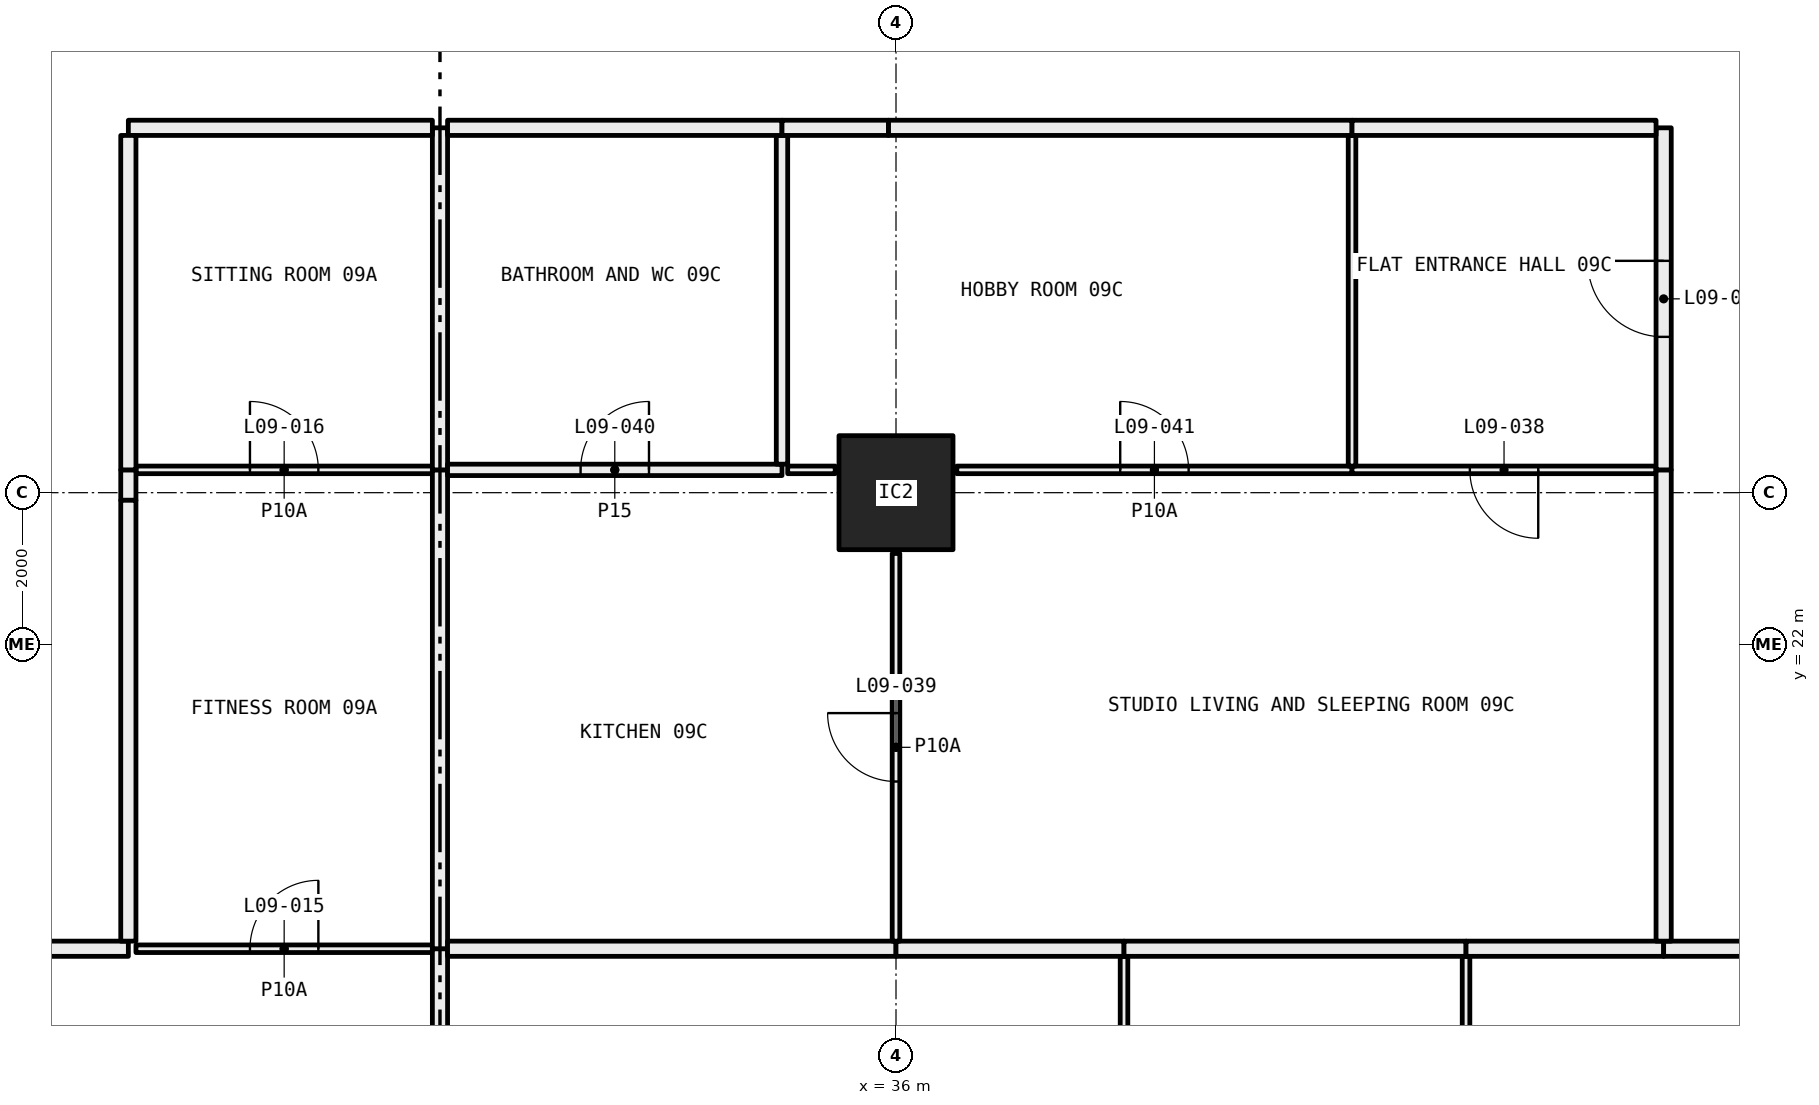
"""IFC4 building model, lengths in metres.
Left out: names, types, materials, properties, quantities, classifications, styles, units other than length and angle.
Written with IfcOpenShell. Run it as: python <this file> out.ifc"""

import sys

from ifc_helpers import new_model, si_unit, direction, frame, frame_2d, origin, origin_2d, place, context, subcontext, project, spatial, rectangle, hollow_rectangle, extrude, element, fill, save


model = new_model("IFC4")
c1 = context("Model", 3, precision=1e-05, world=origin(), true_north=direction((0.0, 1.0)))
c2 = subcontext(c1, "Body", "Model", "MODEL_VIEW")
j1 = project(units=[si_unit("LENGTHUNIT", "METRE"), si_unit("PLANEANGLEUNIT", "RADIAN")], contexts=[c1])
p1 = place(None, origin())
s1 = spatial("IfcSite", under=j1, at=p1, CompositionType="ELEMENT")
p2 = place(p1, origin())
s2 = spatial("IfcBuilding", under=s1, at=p2, CompositionType="ELEMENT")
p3 = place(p2, frame((0.0, 0.0, 43.8)))
s3 = spatial("IfcBuildingStorey", under=s2, at=p3, CompositionType="ELEMENT", Elevation=43.8)
p4 = place(p3, frame((36.0, 24.0, 0.0), z_axis=(0.0, 0.0, 1.0), x_axis=(1.0, 0.0, 0.0)))
e1 = element("IfcColumn", 1, at=p4, inside=s3, PredefinedType="COLUMN", context=c2, shape_type="SweptSolid", body=[
    extrude(hollow_rectangle(XDim=1.5, YDim=1.5, WallThickness=0.065, at=origin_2d()), origin(), (0.0, 0.0, 1.0), 3.05),
])
p5 = place(p3, frame((29.9, 18.0, 0.0), z_axis=(0.0, 0.0, 1.0), x_axis=(-1.0, 0.0, 0.0)))
e2 = element("IfcWall", 2, at=p5, inside=s3, PredefinedType="PARTITIONING", context=c2, shape_type="SweptSolid", body=[
    extrude(rectangle(XDim=3.9, YDim=0.1, at=frame_2d((1.95, 0.0))), origin(), (0.0, 0.0, 1.0), 3.05),
])
p6 = place(p5, frame((1.5, 0.0, 0.0)))
e3 = element("IfcOpeningElement", 3, at=p6, cuts=e2, PredefinedType="OPENING", context=c2, shape_type="SweptSolid", body=[
    extrude(rectangle(XDim=0.9, YDim=2.1, at=frame_2d((0.45, 1.05))), frame((0.0, 0.06, 0.0), z_axis=(0.0, -1.0, 0.0), x_axis=(1.0, 0.0, 0.0)), (0.0, 0.0, 1.0), 0.12),
])
p7 = place(p3, frame((30.0, 12.0, 0.0), z_axis=(0.0, 0.0, 1.0), x_axis=(0.0, 1.0, 0.0)))
e4 = element("IfcWall", 4, at=p7, inside=s3, PredefinedType="PARTITIONING", context=c2, shape_type="SweptSolid", body=[
    extrude(rectangle(XDim=6.0, YDim=0.2, at=frame_2d((3.0, 0.0))), origin(), (0.0, 0.0, 1.0), 2.45),
])
p8 = place(p3, frame((25.9, 18.0, 0.0), z_axis=(0.0, 0.0, 1.0), x_axis=(-1.0, 0.0, 0.0)))
e5 = element("IfcWall", 5, at=p8, inside=s3, PredefinedType="PARTITIONING", context=c2, shape_type="SweptSolid", body=[
    extrude(rectangle(XDim=1.9, YDim=0.2, at=frame_2d((0.95, 0.0))), origin(), (0.0, 0.0, 1.0), 3.05),
])
p9 = place(p3, frame((29.9, 24.3, 0.0), z_axis=(0.0, 0.0, 1.0), x_axis=(-1.0, 0.0, 0.0)))
e6 = element("IfcWall", 6, at=p9, inside=s3, PredefinedType="PARTITIONING", context=c2, shape_type="SweptSolid", body=[
    extrude(rectangle(XDim=3.9, YDim=0.1, at=frame_2d((1.95, 0.0))), origin(), (0.0, 0.0, 1.0), 3.05),
])
p10 = place(p9, frame((1.5, 0.0, 0.0)))
e7 = element("IfcOpeningElement", 7, at=p10, cuts=e6, PredefinedType="OPENING", context=c2, shape_type="SweptSolid", body=[
    extrude(rectangle(XDim=0.9, YDim=2.1, at=frame_2d((0.45, 1.05))), frame((0.0, 0.06, 0.0), z_axis=(0.0, -1.0, 0.0), x_axis=(1.0, 0.0, 0.0)), (0.0, 0.0, 1.0), 0.12),
])
p11 = place(p3, frame((30.0, 18.0, 0.0), z_axis=(0.0, 0.0, 1.0), x_axis=(0.0, 1.0, 0.0)))
e8 = element("IfcWall", 8, at=p11, inside=s3, PredefinedType="PARTITIONING", context=c2, shape_type="SweptSolid", body=[
    extrude(rectangle(XDim=6.3, YDim=0.2, at=frame_2d((3.15, 0.0))), origin(), (0.0, 0.0, 1.0), 2.45),
])
p12 = place(p3, frame((25.9, 24.3, 0.0), z_axis=(0.0, 0.0, 1.0), x_axis=(0.0, -1.0, 0.0)))
e9 = element("IfcWall", 9, at=p12, inside=s3, PredefinedType="PARTITIONING", context=c2, shape_type="SweptSolid", body=[
    extrude(rectangle(XDim=0.4, YDim=0.2, at=frame_2d((0.2, 0.0))), origin(), (0.0, 0.0, 1.0), 2.45),
])
p13 = place(p3, frame((25.9, 23.9, 0.0), z_axis=(0.0, 0.0, 1.0), x_axis=(0.0, -1.0, 0.0)))
e10 = element("IfcWall", 10, at=p13, inside=s3, PredefinedType="PARTITIONING", context=c2, shape_type="SweptSolid", body=[
    extrude(rectangle(XDim=5.8, YDim=0.2, at=frame_2d((2.9, 0.0))), origin(), (0.0, 0.0, 1.0), 3.05),
])
p14 = place(p3, frame((30.0, 24.3, 0.0), z_axis=(0.0, 0.0, 1.0), x_axis=(0.0, 1.0, 0.0)))
e11 = element("IfcWall", 11, at=p14, inside=s3, PredefinedType="PARTITIONING", context=c2, shape_type="SweptSolid", body=[
    extrude(rectangle(XDim=4.5, YDim=0.2, at=frame_2d((2.25, 0.0))), origin(), (0.0, 0.0, 1.0), 3.05),
])
p15 = place(p3, frame((29.9, 28.8, 0.0), z_axis=(0.0, 0.0, 1.0), x_axis=(-1.0, 0.0, 0.0)))
e12 = element("IfcWall", 12, at=p15, inside=s3, PredefinedType="PARTITIONING", context=c2, shape_type="SweptSolid", body=[
    extrude(rectangle(XDim=4.0, YDim=0.2, at=frame_2d((2.0, 0.0))), origin(), (0.0, 0.0, 1.0), 3.05),
])
p16 = place(p3, frame((25.9, 28.7, 0.0), z_axis=(0.0, 0.0, 1.0), x_axis=(0.0, -1.0, 0.0)))
e13 = element("IfcWall", 13, at=p16, inside=s3, PredefinedType="PARTITIONING", context=c2, shape_type="SweptSolid", body=[
    extrude(rectangle(XDim=4.4, YDim=0.2, at=frame_2d((2.2, 0.0))), origin(), (0.0, 0.0, 1.0), 3.05),
])
p17 = place(p3, frame((39.0, 12.05, 0.0), z_axis=(0.0, 0.0, 1.0), x_axis=(0.0, 1.0, 0.0)))
e14 = element("IfcWall", 14, at=p17, inside=s3, PredefinedType="PARTITIONING", context=c2, shape_type="SweptSolid", body=[
    extrude(rectangle(XDim=5.85, YDim=0.1, at=frame_2d((2.925, 0.0))), origin(), (0.0, 0.0, 1.0), 2.45),
])
p18 = place(p3, frame((36.0, 18.0, 0.0), z_axis=(0.0, 0.0, 1.0), x_axis=(-1.0, 0.0, 0.0)))
e15 = element("IfcWall", 15, at=p18, inside=s3, PredefinedType="PARTITIONING", context=c2, shape_type="SweptSolid", body=[
    extrude(rectangle(XDim=5.9, YDim=0.2, at=frame_2d((2.95, 0.0))), origin(), (0.0, 0.0, 1.0), 2.45),
])
p19 = place(p3, frame((39.0, 18.0, 0.0), z_axis=(0.0, 0.0, 1.0), x_axis=(-1.0, 0.0, 0.0)))
e16 = element("IfcWall", 16, at=p19, inside=s3, PredefinedType="PARTITIONING", context=c2, shape_type="SweptSolid", body=[
    extrude(rectangle(XDim=3.0, YDim=0.2, at=frame_2d((1.5, 0.0))), origin(), (0.0, 0.0, 1.0), 2.45),
])
p20 = place(p3, frame((43.5, 12.05, 0.0), z_axis=(0.0, 0.0, 1.0), x_axis=(0.0, 1.0, 0.0)))
e17 = element("IfcWall", 17, at=p20, inside=s3, PredefinedType="PARTITIONING", context=c2, shape_type="SweptSolid", body=[
    extrude(rectangle(XDim=5.85, YDim=0.1, at=frame_2d((2.925, 0.0))), origin(), (0.0, 0.0, 1.0), 2.45),
])
p21 = place(p3, frame((43.5, 18.0, 0.0), z_axis=(0.0, 0.0, 1.0), x_axis=(-1.0, 0.0, 0.0)))
e18 = element("IfcWall", 18, at=p21, inside=s3, PredefinedType="PARTITIONING", context=c2, shape_type="SweptSolid", body=[
    extrude(rectangle(XDim=4.5, YDim=0.2, at=frame_2d((2.25, 0.0))), origin(), (0.0, 0.0, 1.0), 3.05),
])
p22 = place(p3, frame((46.1, 18.0, 0.0), z_axis=(0.0, 0.0, 1.0), x_axis=(-1.0, 0.0, 0.0)))
e19 = element("IfcWall", 19, at=p22, inside=s3, PredefinedType="PARTITIONING", context=c2, shape_type="SweptSolid", body=[
    extrude(rectangle(XDim=2.6, YDim=0.2, at=frame_2d((1.3, 0.0))), origin(), (0.0, 0.0, 1.0), 3.05),
])
p23 = place(p3, frame((48.0, 18.0, 0.0), z_axis=(0.0, 0.0, 1.0), x_axis=(-1.0, 0.0, 0.0)))
e20 = element("IfcWall", 20, at=p23, inside=s3, PredefinedType="PARTITIONING", context=c2, shape_type="SweptSolid", body=[
    extrude(rectangle(XDim=1.9, YDim=0.2, at=frame_2d((0.95, 0.0))), origin(), (0.0, 0.0, 1.0), 3.05),
])
p24 = place(p3, frame((36.0, 18.1, 0.0), z_axis=(0.0, 0.0, 1.0), x_axis=(0.0, 1.0, 0.0)))
e21 = element("IfcWall", 21, at=p24, inside=s3, PredefinedType="PARTITIONING", context=c2, shape_type="SweptSolid", body=[
    extrude(rectangle(XDim=5.1, YDim=0.1, at=frame_2d((2.55, 0.0))), origin(), (0.0, 0.0, 1.0), 2.45),
])
p25 = place(p24, frame((2.1, 0.0, 0.0)))
e22 = element("IfcOpeningElement", 22, at=p25, cuts=e21, PredefinedType="OPENING", context=c2, shape_type="SweptSolid", body=[
    extrude(rectangle(XDim=0.9, YDim=2.1, at=frame_2d((0.45, 1.05))), frame((0.0, 0.06, 0.0), z_axis=(0.0, -1.0, 0.0), x_axis=(1.0, 0.0, 0.0)), (0.0, 0.0, 1.0), 0.12),
])
p26 = place(p3, frame((34.5, 24.3, 0.0), z_axis=(0.0, 0.0, 1.0), x_axis=(-1.0, 0.0, 0.0)))
e23 = element("IfcWall", 23, at=p26, inside=s3, PredefinedType="PARTITIONING", context=c2, shape_type="SweptSolid", body=[
    extrude(rectangle(XDim=4.4, YDim=0.15, at=frame_2d((2.2, 0.0))), origin(), (0.0, 0.0, 1.0), 3.05),
])
p27 = place(p26, frame((1.75, 0.0, 0.0)))
e24 = element("IfcOpeningElement", 24, at=p27, cuts=e23, PredefinedType="OPENING", context=c2, shape_type="SweptSolid", body=[
    extrude(rectangle(XDim=0.9, YDim=2.1, at=frame_2d((0.45, 1.05))), frame((0.0, 0.085, 0.0), z_axis=(0.0, -1.0, 0.0), x_axis=(1.0, 0.0, 0.0)), (0.0, 0.0, 1.0), 0.17),
])
p28 = place(p3, frame((35.2, 24.3, 0.0), z_axis=(0.0, 0.0, 1.0), x_axis=(-1.0, 0.0, 0.0)))
e25 = element("IfcWall", 25, at=p28, inside=s3, PredefinedType="PARTITIONING", context=c2, shape_type="SweptSolid", body=[
    extrude(rectangle(XDim=0.625, YDim=0.1, at=frame_2d((0.312, 0.0))), origin(), (0.0, 0.0, 1.0), 3.05),
])
p29 = place(p3, frame((42.0, 24.3, 0.0), z_axis=(0.0, 0.0, 1.0), x_axis=(-1.0, 0.0, 0.0)))
e26 = element("IfcWall", 26, at=p29, inside=s3, PredefinedType="PARTITIONING", context=c2, shape_type="SweptSolid", body=[
    extrude(rectangle(XDim=5.2, YDim=0.1, at=frame_2d((2.6, 0.0))), origin(), (0.0, 0.0, 1.0), 3.05),
])
p30 = place(p29, frame((2.15, 0.0, 0.0)))
e27 = element("IfcOpeningElement", 27, at=p30, cuts=e26, PredefinedType="OPENING", context=c2, shape_type="SweptSolid", body=[
    extrude(rectangle(XDim=0.9, YDim=2.1, at=frame_2d((0.45, 1.05))), frame((0.0, 0.06, 0.0), z_axis=(0.0, -1.0, 0.0), x_axis=(1.0, 0.0, 0.0)), (0.0, 0.0, 1.0), 0.12),
])
p31 = place(p3, frame((46.0, 24.3, 0.0), z_axis=(0.0, 0.0, 1.0), x_axis=(-1.0, 0.0, 0.0)))
e28 = element("IfcWall", 28, at=p31, inside=s3, PredefinedType="PARTITIONING", context=c2, shape_type="SweptSolid", body=[
    extrude(rectangle(XDim=4.0, YDim=0.1, at=frame_2d((2.0, 0.0))), origin(), (0.0, 0.0, 1.0), 3.05),
])
p32 = place(p31, frame((1.55, 0.0, 0.0)))
e29 = element("IfcOpeningElement", 29, at=p32, cuts=e28, PredefinedType="OPENING", context=c2, shape_type="SweptSolid", body=[
    extrude(rectangle(XDim=0.9, YDim=2.1, at=frame_2d((0.45, 1.05))), frame((0.0, 0.06, 0.0), z_axis=(0.0, -1.0, 0.0), x_axis=(1.0, 0.0, 0.0)), (0.0, 0.0, 1.0), 0.12),
])
p33 = place(p3, frame((46.1, 18.1, 0.0), z_axis=(0.0, 0.0, 1.0), x_axis=(0.0, 1.0, 0.0)))
e30 = element("IfcWall", 30, at=p33, inside=s3, PredefinedType="PARTITIONING", context=c2, shape_type="SweptSolid", body=[
    extrude(rectangle(XDim=6.2, YDim=0.2, at=frame_2d((3.1, 0.0))), origin(), (0.0, 0.0, 1.0), 2.45),
])
p34 = place(p3, frame((34.5, 24.375, 0.0), z_axis=(0.0, 0.0, 1.0), x_axis=(0.0, 1.0, 0.0)))
e31 = element("IfcWall", 31, at=p34, inside=s3, PredefinedType="PARTITIONING", context=c2, shape_type="SweptSolid", body=[
    extrude(rectangle(XDim=4.325, YDim=0.15, at=frame_2d((2.163, 0.0))), origin(), (0.0, 0.0, 1.0), 3.05),
])
p35 = place(p3, frame((34.5, 28.8, 0.0), z_axis=(0.0, 0.0, 1.0), x_axis=(-1.0, 0.0, 0.0)))
e32 = element("IfcWall", 32, at=p35, inside=s3, PredefinedType="PARTITIONING", context=c2, shape_type="SweptSolid", body=[
    extrude(rectangle(XDim=4.4, YDim=0.2, at=frame_2d((2.2, 0.0))), origin(), (0.0, 0.0, 1.0), 3.05),
])
p36 = place(p3, frame((42.0, 24.35, 0.0), z_axis=(0.0, 0.0, 1.0), x_axis=(0.0, 1.0, 0.0)))
e33 = element("IfcWall", 33, at=p36, inside=s3, PredefinedType="PARTITIONING", context=c2, shape_type="SweptSolid", body=[
    extrude(rectangle(XDim=4.35, YDim=0.1, at=frame_2d((2.175, 0.0))), origin(), (0.0, 0.0, 1.0), 3.05),
])
p37 = place(p3, frame((42.0, 28.8, 0.0), z_axis=(0.0, 0.0, 1.0), x_axis=(-1.0, 0.0, 0.0)))
e34 = element("IfcWall", 34, at=p37, inside=s3, PredefinedType="PARTITIONING", context=c2, shape_type="SweptSolid", body=[
    extrude(rectangle(XDim=6.1, YDim=0.2, at=frame_2d((3.05, 0.0))), origin(), (0.0, 0.0, 1.0), 2.45),
])
p38 = place(p3, frame((35.9, 28.8, 0.0), z_axis=(0.0, 0.0, 1.0), x_axis=(-1.0, 0.0, 0.0)))
e35 = element("IfcWall", 35, at=p38, inside=s3, PredefinedType="PARTITIONING", context=c2, shape_type="SweptSolid", body=[
    extrude(rectangle(XDim=1.4, YDim=0.2, at=frame_2d((0.7, 0.0))), origin(), (0.0, 0.0, 1.0), 3.05),
])
p39 = place(p3, frame((46.1, 24.3, 0.0), z_axis=(0.0, 0.0, 1.0), x_axis=(0.0, 1.0, 0.0)))
e36 = element("IfcWall", 36, at=p39, inside=s3, PredefinedType="PARTITIONING", context=c2, shape_type="SweptSolid", body=[
    extrude(rectangle(XDim=4.5, YDim=0.2, at=frame_2d((2.25, 0.0))), origin(), (0.0, 0.0, 1.0), 3.05),
])
p40 = place(p39, frame((1.75, 0.0, 0.0)))
e37 = element("IfcOpeningElement", 37, at=p40, cuts=e36, PredefinedType="OPENING", context=c2, shape_type="SweptSolid", body=[
    extrude(rectangle(XDim=1.0, YDim=2.1, at=frame_2d((0.5, 1.05))), frame((0.0, 0.11, 0.0), z_axis=(0.0, -1.0, 0.0), x_axis=(1.0, 0.0, 0.0)), (0.0, 0.0, 1.0), 0.22),
])
p41 = place(p3, frame((46.0, 28.8, 0.0), z_axis=(0.0, 0.0, 1.0), x_axis=(-1.0, 0.0, 0.0)))
e38 = element("IfcWall", 38, at=p41, inside=s3, PredefinedType="PARTITIONING", context=c2, shape_type="SweptSolid", body=[
    extrude(rectangle(XDim=4.0, YDim=0.2, at=frame_2d((2.0, 0.0))), origin(), (0.0, 0.0, 1.0), 3.05),
])
p42 = place(p6, frame((0.9, 0.0, 0.0), x_axis=(-1.0, 0.0, 0.0)))
e39 = element("IfcDoor", 39, at=p42, inside=s3, OperationType="SINGLE_SWING_LEFT", PredefinedType="DOOR", context=c2, shape_type="SweptSolid", body=[
    extrude(rectangle(XDim=0.9, YDim=2.1, at=frame_2d((0.45, 1.05))), frame((0.0, 0.025, 0.0), z_axis=(0.0, -1.0, 0.0), x_axis=(1.0, 0.0, 0.0)), (0.0, 0.0, 1.0), 0.05),
])
fill(e3, e39)
p43 = place(p10, frame((0.9, 0.0, 0.0), x_axis=(-1.0, 0.0, 0.0)))
e40 = element("IfcDoor", 40, at=p43, inside=s3, OperationType="SINGLE_SWING_RIGHT", PredefinedType="DOOR", context=c2, shape_type="SweptSolid", body=[
    extrude(rectangle(XDim=0.9, YDim=2.1, at=frame_2d((0.45, 1.05))), frame((0.0, 0.025, 0.0), z_axis=(0.0, -1.0, 0.0), x_axis=(1.0, 0.0, 0.0)), (0.0, 0.0, 1.0), 0.05),
])
fill(e7, e40)
p44 = place(p40, origin())
e41 = element("IfcDoor", 41, at=p44, inside=s3, OperationType="SINGLE_SWING_LEFT", PredefinedType="DOOR", context=c2, shape_type="SweptSolid", body=[
    extrude(rectangle(XDim=1.0, YDim=2.1, at=frame_2d((0.5, 1.05))), frame((0.0, 0.025, 0.0), z_axis=(0.0, -1.0, 0.0), x_axis=(1.0, 0.0, 0.0)), (0.0, 0.0, 1.0), 0.05),
])
fill(e37, e41)
p45 = place(p32, origin())
e42 = element("IfcDoor", 42, at=p45, inside=s3, OperationType="SINGLE_SWING_RIGHT", PredefinedType="DOOR", context=c2, shape_type="SweptSolid", body=[
    extrude(rectangle(XDim=0.9, YDim=2.1, at=frame_2d((0.45, 1.05))), frame((0.0, 0.025, 0.0), z_axis=(0.0, -1.0, 0.0), x_axis=(1.0, 0.0, 0.0)), (0.0, 0.0, 1.0), 0.05),
])
fill(e29, e42)
p46 = place(p25, origin())
e43 = element("IfcDoor", 43, at=p46, inside=s3, OperationType="SINGLE_SWING_LEFT", PredefinedType="DOOR", context=c2, shape_type="SweptSolid", body=[
    extrude(rectangle(XDim=0.9, YDim=2.1, at=frame_2d((0.45, 1.05))), frame((0.0, 0.025, 0.0), z_axis=(0.0, -1.0, 0.0), x_axis=(1.0, 0.0, 0.0)), (0.0, 0.0, 1.0), 0.05),
])
fill(e22, e43)
p47 = place(p27, frame((0.9, 0.0, 0.0), x_axis=(-1.0, 0.0, 0.0)))
e44 = element("IfcDoor", 44, at=p47, inside=s3, OperationType="SINGLE_SWING_LEFT", PredefinedType="DOOR", context=c2, shape_type="SweptSolid", body=[
    extrude(rectangle(XDim=0.9, YDim=2.1, at=frame_2d((0.45, 1.05))), frame((0.0, 0.025, 0.0), z_axis=(0.0, -1.0, 0.0), x_axis=(1.0, 0.0, 0.0)), (0.0, 0.0, 1.0), 0.05),
])
fill(e24, e44)
p48 = place(p30, frame((0.9, 0.0, 0.0), x_axis=(-1.0, 0.0, 0.0)))
e45 = element("IfcDoor", 45, at=p48, inside=s3, OperationType="SINGLE_SWING_RIGHT", PredefinedType="DOOR", context=c2, shape_type="SweptSolid", body=[
    extrude(rectangle(XDim=0.9, YDim=2.1, at=frame_2d((0.45, 1.05))), frame((0.0, 0.025, 0.0), z_axis=(0.0, -1.0, 0.0), x_axis=(1.0, 0.0, 0.0)), (0.0, 0.0, 1.0), 0.05),
])
fill(e27, e45)
save(model, sys.argv[1])
